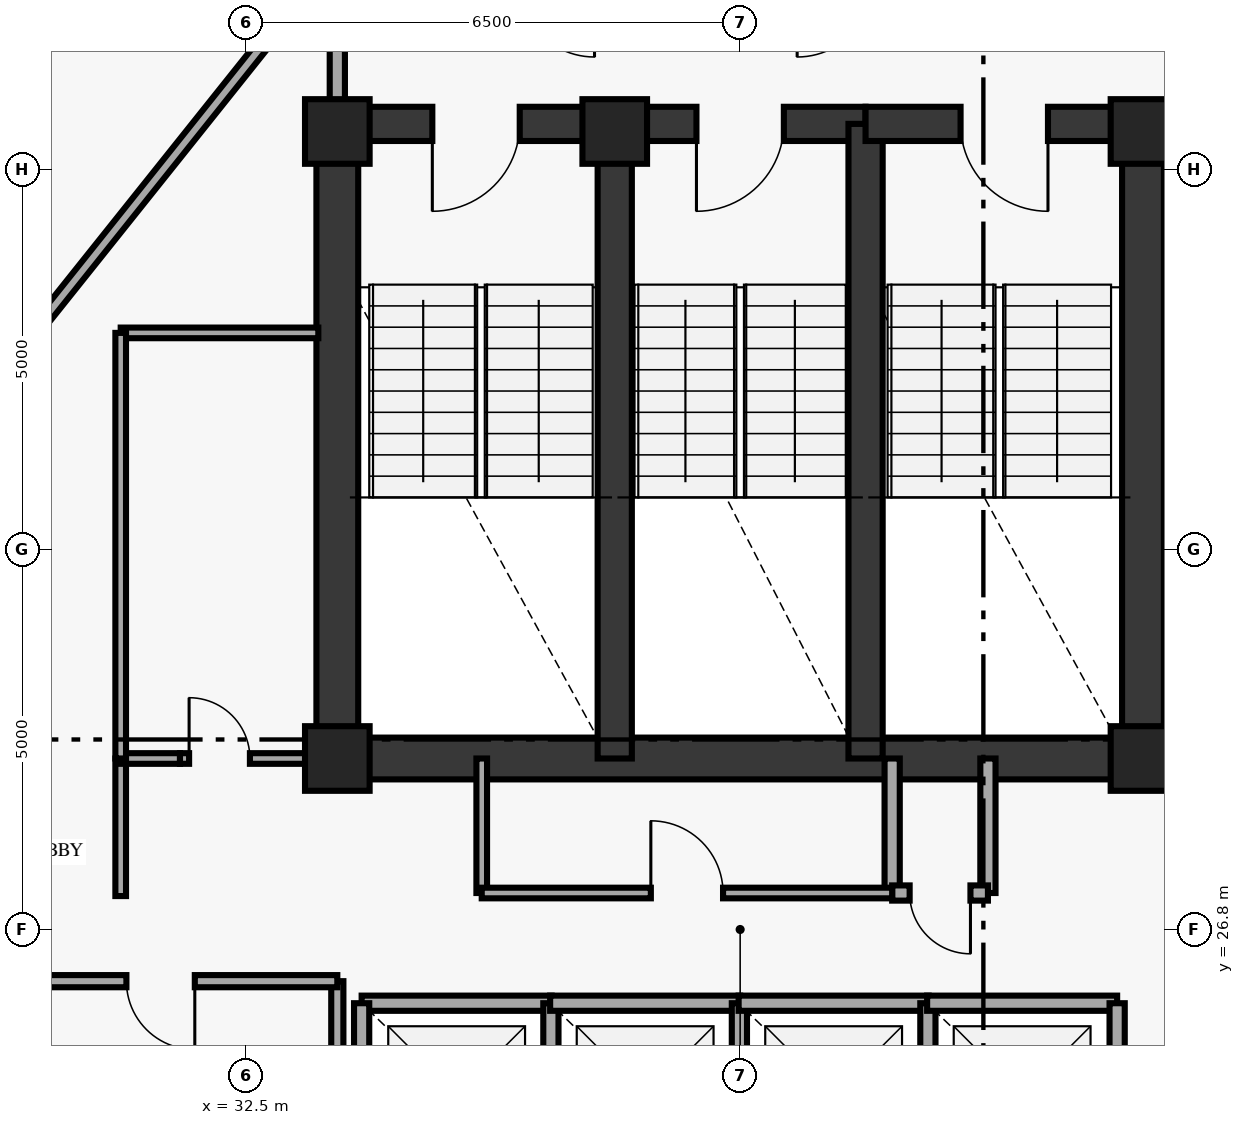
"""IFC4 building model, lengths in metres.
Left out: names, types, materials, properties, quantities, classifications, styles, units other than length and angle.
Written with IfcOpenShell. Run it as: python <this file> out.ifc"""

import sys

from ifc_helpers import new_model, si_unit, direction, frame, frame_2d, origin, origin_2d, place, context, subcontext, project, spatial, rectangle, extrude, element, fill, save


model = new_model("IFC4")
c1 = context("Model", 3, precision=1e-05, world=origin(), true_north=direction((0.0, 1.0)))
c2 = subcontext(c1, "Body", "Model", "MODEL_VIEW")
j1 = project(units=[si_unit("LENGTHUNIT", "METRE"), si_unit("PLANEANGLEUNIT", "RADIAN")], contexts=[c1])
p1 = place(None, origin())
s1 = spatial("IfcSite", under=j1, at=p1, CompositionType="ELEMENT")
p2 = place(p1, origin())
s2 = spatial("IfcBuilding", under=s1, at=p2, CompositionType="ELEMENT")
p3 = place(p2, frame((0.0, 0.0, 251.95)))
s3 = spatial("IfcBuildingStorey", under=s2, at=p3, CompositionType="ELEMENT", Elevation=251.95)
for number, where, z_axis, x_axis in (
    (1, (44.3, 29.05, 0.0), (0.0, 0.0, 1.0), (1.0, 0.0, 0.0)),
    (2, (44.3, 37.3, 0.0), (0.0, 0.0, 1.0), (1.0, 0.0, 0.0)),
    (3, (37.35, 37.3, 0.0), (0.0, 0.0, 1.0), (1.0, 0.0, 0.0)),
    (4, (33.7, 37.3, 0.0), (0.0, 0.0, 1.0), (1.0, 0.0, 0.0)),
    (5, (33.7, 29.05, 0.0), (0.0, 0.0, 1.0), (1.0, 0.0, 0.0)),
):
    element("IfcColumn", number, at=place(p3, frame(where, z_axis=z_axis, x_axis=x_axis)), inside=s3, PredefinedType="PILASTER", context=c2, shape_type="SweptSolid", body=[
        extrude(rectangle(XDim=0.85, YDim=0.85, at=origin_2d()), origin(), (0.0, 0.0, 1.0), 3.39),
    ])
for number, where, z_axis, x_axis in (
    (6, (33.7, 29.05, 0.0), (0.0, 0.0, 1.0), (0.0, 1.0, 0.0)),
    (7, (44.3, 29.05, 0.0), (0.0, 0.0, 1.0), (0.0, 1.0, 0.0)),
):
    element("IfcWall", number, at=place(p3, frame(where, z_axis=z_axis, x_axis=x_axis)), inside=s3, PredefinedType="SHEAR", context=c2, shape_type="SweptSolid", body=[
        extrude(rectangle(XDim=8.35, YDim=0.55, at=frame_2d((4.175, 0.0))), origin(), (0.0, 0.0, 1.0), 3.39),
    ])
p4 = place(p3, frame((33.7, 29.05, 0.0), z_axis=(0.0, 0.0, 1.0), x_axis=(1.0, 0.0, 0.0)))
e8 = element("IfcWall", 8, at=p4, inside=s3, PredefinedType="SHEAR", context=c2, shape_type="SweptSolid", body=[
    extrude(rectangle(XDim=10.6, YDim=0.55, at=frame_2d((5.3, 0.0))), origin(), (0.0, 0.0, 1.0), 3.39),
])
p5 = place(p3, frame((37.35, 37.4, 0.0), z_axis=(0.0, 0.0, 1.0), x_axis=(-1.0, 0.0, 0.0)))
e9 = element("IfcWall", 9, at=p5, inside=s3, PredefinedType="SHEAR", context=c2, shape_type="SweptSolid", body=[
    extrude(rectangle(XDim=3.65, YDim=0.45, at=frame_2d((1.825, 0.0))), origin(), (0.0, 0.0, 1.0), 3.39),
])
p6 = place(p5, frame((1.25, 0.0, 0.0)))
e10 = element("IfcOpeningElement", 10, at=p6, cuts=e9, PredefinedType="OPENING", context=c2, shape_type="SweptSolid", body=[
    extrude(rectangle(XDim=1.15, YDim=2.15, at=frame_2d((0.575, 1.075))), frame((0.0, 0.235, 0.0), z_axis=(0.0, -1.0, 0.0), x_axis=(1.0, 0.0, 0.0)), (0.0, 0.0, 1.0), 0.47),
])
p7 = place(p3, frame((37.35, 29.05, 0.0), z_axis=(0.0, 0.0, 1.0), x_axis=(0.0, 1.0, 0.0)))
e11 = element("IfcWall", 11, at=p7, inside=s3, PredefinedType="SHEAR", context=c2, shape_type="SweptSolid", body=[
    extrude(rectangle(XDim=8.35, YDim=0.45, at=frame_2d((4.175, 0.0))), origin(), (0.0, 0.0, 1.0), 3.39),
])
p8 = place(p3, frame((40.65, 37.4, 0.0), z_axis=(0.0, 0.0, 1.0), x_axis=(-1.0, 0.0, 0.0)))
e12 = element("IfcWall", 12, at=p8, inside=s3, PredefinedType="SHEAR", context=c2, shape_type="SweptSolid", body=[
    extrude(rectangle(XDim=3.3, YDim=0.45, at=frame_2d((1.65, 0.0))), origin(), (0.0, 0.0, 1.0), 3.39),
])
p9 = place(p8, frame((1.075, 0.0, 0.0)))
e13 = element("IfcOpeningElement", 13, at=p9, cuts=e12, PredefinedType="OPENING", context=c2, shape_type="SweptSolid", body=[
    extrude(rectangle(XDim=1.15, YDim=2.15, at=frame_2d((0.575, 1.075))), frame((0.0, 0.235, 0.0), z_axis=(0.0, -1.0, 0.0), x_axis=(1.0, 0.0, 0.0)), (0.0, 0.0, 1.0), 0.47),
])
p10 = place(p3, frame((40.65, 29.05, 0.0), z_axis=(0.0, 0.0, 1.0), x_axis=(0.0, 1.0, 0.0)))
e14 = element("IfcWall", 14, at=p10, inside=s3, PredefinedType="SHEAR", context=c2, shape_type="SweptSolid", body=[
    extrude(rectangle(XDim=8.35, YDim=0.45, at=frame_2d((4.175, 0.0))), origin(), (0.0, 0.0, 1.0), 3.39),
])
p11 = place(p3, frame((44.3, 37.4, 0.0), z_axis=(0.0, 0.0, 1.0), x_axis=(-1.0, 0.0, 0.0)))
e15 = element("IfcWall", 15, at=p11, inside=s3, PredefinedType="SHEAR", context=c2, shape_type="SweptSolid", body=[
    extrude(rectangle(XDim=3.65, YDim=0.45, at=frame_2d((1.825, 0.0))), origin(), (0.0, 0.0, 1.0), 3.39),
])
p12 = place(p11, frame((1.25, 0.0, 0.0)))
e16 = element("IfcOpeningElement", 16, at=p12, cuts=e15, PredefinedType="OPENING", context=c2, shape_type="SweptSolid", body=[
    extrude(rectangle(XDim=1.15, YDim=2.15, at=frame_2d((0.575, 1.075))), frame((0.0, 0.235, 0.0), z_axis=(0.0, -1.0, 0.0), x_axis=(1.0, 0.0, 0.0)), (0.0, 0.0, 1.0), 0.47),
])
p13 = place(p3, frame((33.7, 37.4, 0.0), z_axis=(0.0, 0.0, 1.0), x_axis=(0.0, 1.0, 0.0)))
e17 = element("IfcWall", 17, at=p13, inside=s3, PredefinedType="SOLIDWALL", context=c2, shape_type="SweptSolid", body=[
    extrude(rectangle(XDim=1.88, YDim=0.2, at=frame_2d((0.94, 0.0))), origin(), (0.0, 0.0, 1.0), 3.39),
])
p14 = place(p3, frame((35.6, 27.28, 0.0), z_axis=(0.0, 0.0, 1.0), x_axis=(0.0, 1.0, 0.0)))
e18 = element("IfcWall", 18, at=p14, inside=s3, PredefinedType="PARTITIONING", context=c2, shape_type="SweptSolid", body=[
    extrude(rectangle(XDim=1.77, YDim=0.14, at=frame_2d((0.885, 0.0))), origin(), (0.0, 0.0, 1.0), 3.39),
])
for number, where, z_axis, x_axis in (
    (19, (41.0, 27.28, 0.0), (0.0, 0.0, 1.0), (0.0, 1.0, 0.0)),
    (20, (42.26, 27.28, 0.0), (0.0, 0.0, 1.0), (0.0, 1.0, 0.0)),
):
    element("IfcWall", number, at=place(p3, frame(where, z_axis=z_axis, x_axis=x_axis)), inside=s3, PredefinedType="SOLIDWALL", context=c2, shape_type="SweptSolid", body=[
        extrude(rectangle(XDim=1.77, YDim=0.2, at=frame_2d((0.885, 0.0))), origin(), (0.0, 0.0, 1.0), 3.39),
    ])
p15 = place(p3, frame((41.0, 27.28, 0.0), z_axis=(0.0, 0.0, 1.0), x_axis=(1.0, 0.0, 0.0)))
e21 = element("IfcWall", 21, at=p15, inside=s3, PredefinedType="SOLIDWALL", context=c2, shape_type="SweptSolid", body=[
    extrude(rectangle(XDim=1.26, YDim=0.2, at=frame_2d((0.63, 0.0))), origin(), (0.0, 0.0, 1.0), 3.39),
])
p16 = place(p15, frame((0.23, 0.0, 0.0)))
e22 = element("IfcOpeningElement", 22, at=p16, cuts=e21, PredefinedType="OPENING", context=c2, shape_type="SweptSolid", body=[
    extrude(rectangle(XDim=0.8, YDim=2.05, at=frame_2d((0.4, 1.025))), frame((0.0, 0.11, 0.0), z_axis=(0.0, -1.0, 0.0), x_axis=(1.0, 0.0, 0.0)), (0.0, 0.0, 1.0), 0.22),
])
p17 = place(p3, frame((34.02, 25.83, 0.0), z_axis=(0.0, 0.0, 1.0), x_axis=(1.0, 0.0, 0.0)))
e23 = element("IfcWall", 23, at=p17, inside=s3, PredefinedType="SOLIDWALL", context=c2, shape_type="SweptSolid", body=[
    extrude(rectangle(XDim=2.5, YDim=0.2, at=frame_2d((1.25, 0.0))), origin(), (0.0, 0.0, 1.0), 3.39),
])
for number, where, z_axis, x_axis in (
    (24, (34.02, 23.42, 0.0), (0.0, 0.0, 1.0), (0.0, 1.0, 0.0)),
    (25, (36.51, 23.42, 0.0), (0.0, 0.0, 1.0), (0.0, 1.0, 0.0)),
):
    element("IfcWall", number, at=place(p3, frame(where, z_axis=z_axis, x_axis=x_axis)), inside=s3, PredefinedType="SOLIDWALL", context=c2, shape_type="SweptSolid", body=[
        extrude(rectangle(XDim=2.41, YDim=0.2, at=frame_2d((1.205, 0.0))), origin(), (0.0, 0.0, 1.0), 3.39),
    ])
p18 = place(p3, frame((36.5, 25.83, 0.0), z_axis=(0.0, 0.0, 1.0), x_axis=(1.0, 0.0, 0.0)))
e26 = element("IfcWall", 26, at=p18, inside=s3, PredefinedType="SOLIDWALL", context=c2, shape_type="SweptSolid", body=[
    extrude(rectangle(XDim=2.5, YDim=0.2, at=frame_2d((1.25, 0.0))), origin(), (0.0, 0.0, 1.0), 3.39),
])
p19 = place(p3, frame((38.99, 23.42, 0.0), z_axis=(0.0, 0.0, 1.0), x_axis=(0.0, 1.0, 0.0)))
e27 = element("IfcWall", 27, at=p19, inside=s3, PredefinedType="SOLIDWALL", context=c2, shape_type="SweptSolid", body=[
    extrude(rectangle(XDim=2.41, YDim=0.2, at=frame_2d((1.205, 0.0))), origin(), (0.0, 0.0, 1.0), 3.39),
])
p20 = place(p3, frame((38.98, 25.83, 0.0), z_axis=(0.0, 0.0, 1.0), x_axis=(1.0, 0.0, 0.0)))
e28 = element("IfcWall", 28, at=p20, inside=s3, PredefinedType="SOLIDWALL", context=c2, shape_type="SweptSolid", body=[
    extrude(rectangle(XDim=2.5, YDim=0.2, at=frame_2d((1.25, 0.0))), origin(), (0.0, 0.0, 1.0), 3.39),
])
p21 = place(p3, frame((41.47, 23.42, 0.0), z_axis=(0.0, 0.0, 1.0), x_axis=(0.0, 1.0, 0.0)))
e29 = element("IfcWall", 29, at=p21, inside=s3, PredefinedType="SOLIDWALL", context=c2, shape_type="SweptSolid", body=[
    extrude(rectangle(XDim=2.41, YDim=0.2, at=frame_2d((1.205, 0.0))), origin(), (0.0, 0.0, 1.0), 3.39),
])
p22 = place(p3, frame((41.46, 25.83, 0.0), z_axis=(0.0, 0.0, 1.0), x_axis=(1.0, 0.0, 0.0)))
e30 = element("IfcWall", 30, at=p22, inside=s3, PredefinedType="SOLIDWALL", context=c2, shape_type="SweptSolid", body=[
    extrude(rectangle(XDim=2.5, YDim=0.2, at=frame_2d((1.25, 0.0))), origin(), (0.0, 0.0, 1.0), 3.39),
])
p23 = place(p3, frame((43.96, 23.42, 0.0), z_axis=(0.0, 0.0, 1.0), x_axis=(0.0, 1.0, 0.0)))
e31 = element("IfcWall", 31, at=p23, inside=s3, PredefinedType="SOLIDWALL", context=c2, shape_type="SweptSolid", body=[
    extrude(rectangle(XDim=2.41, YDim=0.2, at=frame_2d((1.205, 0.0))), origin(), (0.0, 0.0, 1.0), 3.39),
])
p24 = place(p3, frame((33.7, 23.45, 0.0), z_axis=(0.0, 0.0, 1.0), x_axis=(0.0, 1.0, 0.0)))
e32 = element("IfcWall", 32, at=p24, inside=s3, PredefinedType="PARTITIONING", context=c2, shape_type="SweptSolid", body=[
    extrude(rectangle(XDim=2.67, YDim=0.16, at=frame_2d((1.335, 0.0))), origin(), (0.0, 0.0, 1.0), 2.775),
])
p25 = place(p3, frame((33.7, 26.12, 0.0), z_axis=(0.0, 0.0, 1.0), x_axis=(-1.0, 0.0, 0.0)))
e33 = element("IfcWall", 33, at=p25, inside=s3, PredefinedType="PARTITIONING", context=c2, shape_type="SweptSolid", body=[
    extrude(rectangle(XDim=4.65, YDim=0.16, at=frame_2d((2.325, 0.0))), origin(), (0.0, 0.0, 1.0), 3.39),
])
p26 = place(p25, frame((1.875, 0.0, 0.0)))
e34 = element("IfcOpeningElement", 34, at=p26, cuts=e33, PredefinedType="OPENING", context=c2, shape_type="SweptSolid", body=[
    extrude(rectangle(XDim=0.9, YDim=2.02, at=frame_2d((0.45, 1.01))), frame((0.0, 0.09, 0.0), z_axis=(0.0, -1.0, 0.0), x_axis=(1.0, 0.0, 0.0)), (0.0, 0.0, 1.0), 0.18),
])
p27 = place(p3, frame((35.6, 27.28, 0.0), z_axis=(0.0, 0.0, 1.0), x_axis=(1.0, 0.0, 0.0)))
e35 = element("IfcWall", 35, at=p27, inside=s3, PredefinedType="PARTITIONING", context=c2, shape_type="SweptSolid", body=[
    extrude(rectangle(XDim=5.4, YDim=0.14, at=frame_2d((2.7, 0.0))), origin(), (0.0, 0.0, 1.0), 3.39),
])
p28 = place(p27, frame((2.225, 0.0, 0.0)))
e36 = element("IfcOpeningElement", 36, at=p28, cuts=e35, PredefinedType="OPENING", context=c2, shape_type="SweptSolid", body=[
    extrude(rectangle(XDim=0.95, YDim=2.1, at=frame_2d((0.475, 1.05))), frame((0.0, 0.08, 0.0), z_axis=(0.0, -1.0, 0.0), x_axis=(1.0, 0.0, 0.0)), (0.0, 0.0, 1.0), 0.16),
])
p29 = place(p3, frame((30.85, 27.24, 0.0), z_axis=(0.0, 0.0, 1.0), x_axis=(0.0, 1.0, 0.0)))
e37 = element("IfcWall", 37, at=p29, inside=s3, PredefinedType="PARTITIONING", context=c2, shape_type="SweptSolid", body=[
    extrude(rectangle(XDim=1.81, YDim=0.14, at=frame_2d((0.905, 0.0))), origin(), (0.0, 0.0, 1.0), 3.39),
])
p30 = place(p3, frame((30.85, 29.05, 0.0), z_axis=(0.0, 0.0, 1.0), x_axis=(1.0, 0.0, 0.0)))
e38 = element("IfcWall", 38, at=p30, inside=s3, PredefinedType="PARTITIONING", context=c2, shape_type="SweptSolid", body=[
    extrude(rectangle(XDim=0.78, YDim=0.14, at=frame_2d((0.39, 0.0))), origin(), (0.0, 0.0, 1.0), 3.39),
])
p31 = place(p3, frame((31.63, 29.05, 0.0), z_axis=(0.0, 0.0, 1.0), x_axis=(1.0, 0.0, 0.0)))
e39 = element("IfcWall", 39, at=p31, inside=s3, PredefinedType="PARTITIONING", context=c2, shape_type="SweptSolid", body=[
    extrude(rectangle(XDim=1.82, YDim=0.14, at=frame_2d((0.91, 0.0))), origin(), (0.0, 0.0, 1.0), 2.53),
])
p32 = place(p31, frame((0.12, 0.0, 0.0)))
e40 = element("IfcOpeningElement", 40, at=p32, cuts=e39, PredefinedType="OPENING", context=c2, shape_type="SweptSolid", body=[
    extrude(rectangle(XDim=0.8, YDim=2.05, at=frame_2d((0.4, 1.025))), frame((0.0, 0.08, 0.0), z_axis=(0.0, -1.0, 0.0), x_axis=(1.0, 0.0, 0.0)), (0.0, 0.0, 1.0), 0.16),
])
p33 = place(p3, frame((30.85, 34.65, 0.0), z_axis=(0.0, 0.0, 1.0), x_axis=(1.0, 0.0, 0.0)))
e41 = element("IfcWall", 41, at=p33, inside=s3, PredefinedType="PARTITIONING", context=c2, shape_type="SweptSolid", body=[
    extrude(rectangle(XDim=2.6, YDim=0.14, at=frame_2d((1.3, 0.0))), origin(), (0.0, 0.0, 1.0), 3.39),
])
p34 = place(p3, frame((30.85, 29.05, 0.0), z_axis=(0.0, 0.0, 1.0), x_axis=(0.0, 1.0, 0.0)))
e42 = element("IfcWall", 42, at=p34, inside=s3, PredefinedType="PARTITIONING", context=c2, shape_type="SweptSolid", body=[
    extrude(rectangle(XDim=5.6, YDim=0.14, at=frame_2d((2.8, 0.0))), origin(), (0.0, 0.0, 1.0), 3.39),
])
p35 = place(p3, frame((33.3, 39.167, 0.0), z_axis=(0.0, 0.0, 1.0), x_axis=(-0.623915746766, -0.781491612839, 0.0)))
e43 = element("IfcWall", 43, at=p35, inside=s3, PredefinedType="PARTITIONING", context=c2, shape_type="SweptSolid", body=[
    extrude(rectangle(XDim=6.688, YDim=0.16, at=frame_2d((3.344, 0.0))), origin(), (0.0, 0.0, 1.0), 3.39),
])
p36 = place(p3, frame((28.832, 38.163, 0.0), z_axis=(0.0, 0.0, 1.0), x_axis=(0.759085259689, 0.650991220004, 0.0)))
e44 = element("IfcWall", 44, at=p36, inside=s3, PredefinedType="PARTITIONING", context=c2, shape_type="SweptSolid", body=[
    extrude(rectangle(XDim=3.923, YDim=0.125, at=frame_2d((1.961, 0.0))), origin(), (0.0, 0.0, 1.0), 3.39),
])
p37 = place(p36, frame((2.823, 0.0, 0.0)))
e45 = element("IfcOpeningElement", 45, at=p37, cuts=e44, PredefinedType="OPENING", context=c2, shape_type="SweptSolid", body=[
    extrude(rectangle(XDim=0.9, YDim=2.02, at=frame_2d((0.45, 1.01))), frame((0.0, 0.073, 0.0), z_axis=(0.0, -1.0, 0.0), x_axis=(1.0, 0.0, 0.0)), (0.0, 0.0, 1.0), 0.145),
])
p38 = place(p6, origin())
e46 = element("IfcDoor", 46, at=p38, inside=s3, OperationType="SINGLE_SWING_RIGHT", PredefinedType="DOOR", context=c2, shape_type="SweptSolid", body=[
    extrude(rectangle(XDim=1.15, YDim=2.15, at=frame_2d((0.575, 1.075))), frame((0.0, 0.025, 0.0), z_axis=(0.0, -1.0, 0.0), x_axis=(1.0, 0.0, 0.0)), (0.0, 0.0, 1.0), 0.05),
])
fill(e10, e46)
p39 = place(p9, origin())
e47 = element("IfcDoor", 47, at=p39, inside=s3, OperationType="SINGLE_SWING_RIGHT", PredefinedType="DOOR", context=c2, shape_type="SweptSolid", body=[
    extrude(rectangle(XDim=1.15, YDim=2.15, at=frame_2d((0.575, 1.075))), frame((0.0, 0.025, 0.0), z_axis=(0.0, -1.0, 0.0), x_axis=(1.0, 0.0, 0.0)), (0.0, 0.0, 1.0), 0.05),
])
fill(e13, e47)
p40 = place(p12, origin())
e48 = element("IfcDoor", 48, at=p40, inside=s3, OperationType="SINGLE_SWING_LEFT", PredefinedType="DOOR", context=c2, shape_type="SweptSolid", body=[
    extrude(rectangle(XDim=1.15, YDim=2.15, at=frame_2d((0.575, 1.075))), frame((0.0, 0.025, 0.0), z_axis=(0.0, -1.0, 0.0), x_axis=(1.0, 0.0, 0.0)), (0.0, 0.0, 1.0), 0.05),
])
fill(e16, e48)
p41 = place(p16, origin())
e49 = element("IfcDoor", 49, at=p41, inside=s3, OperationType="SINGLE_SWING_RIGHT", PredefinedType="DOOR", context=c2, shape_type="SweptSolid", body=[
    extrude(rectangle(XDim=0.8, YDim=2.05, at=frame_2d((0.4, 1.025))), frame((0.0, 0.025, 0.0), z_axis=(0.0, -1.0, 0.0), x_axis=(1.0, 0.0, 0.0)), (0.0, 0.0, 1.0), 0.05),
])
fill(e22, e49)
p42 = place(p26, origin())
e50 = element("IfcDoor", 50, at=p42, inside=s3, OperationType="SINGLE_SWING_LEFT", PredefinedType="DOOR", context=c2, shape_type="SweptSolid", body=[
    extrude(rectangle(XDim=0.9, YDim=2.02, at=frame_2d((0.45, 1.01))), frame((0.0, 0.025, 0.0), z_axis=(0.0, -1.0, 0.0), x_axis=(1.0, 0.0, 0.0)), (0.0, 0.0, 1.0), 0.05),
])
fill(e34, e50)
p43 = place(p28, origin())
e51 = element("IfcDoor", 51, at=p43, inside=s3, OperationType="SINGLE_SWING_LEFT", PredefinedType="DOOR", context=c2, shape_type="SweptSolid", body=[
    extrude(rectangle(XDim=0.95, YDim=2.1, at=frame_2d((0.475, 1.05))), frame((0.0, 0.025, 0.0), z_axis=(0.0, -1.0, 0.0), x_axis=(1.0, 0.0, 0.0)), (0.0, 0.0, 1.0), 0.05),
])
fill(e36, e51)
p44 = place(p32, origin())
e52 = element("IfcDoor", 52, at=p44, inside=s3, OperationType="SINGLE_SWING_LEFT", PredefinedType="DOOR", context=c2, shape_type="SweptSolid", body=[
    extrude(rectangle(XDim=0.8, YDim=2.05, at=frame_2d((0.4, 1.025))), frame((0.0, 0.025, 0.0), z_axis=(0.0, -1.0, 0.0), x_axis=(1.0, 0.0, 0.0)), (0.0, 0.0, 1.0), 0.05),
])
fill(e40, e52)
save(model, sys.argv[1])
